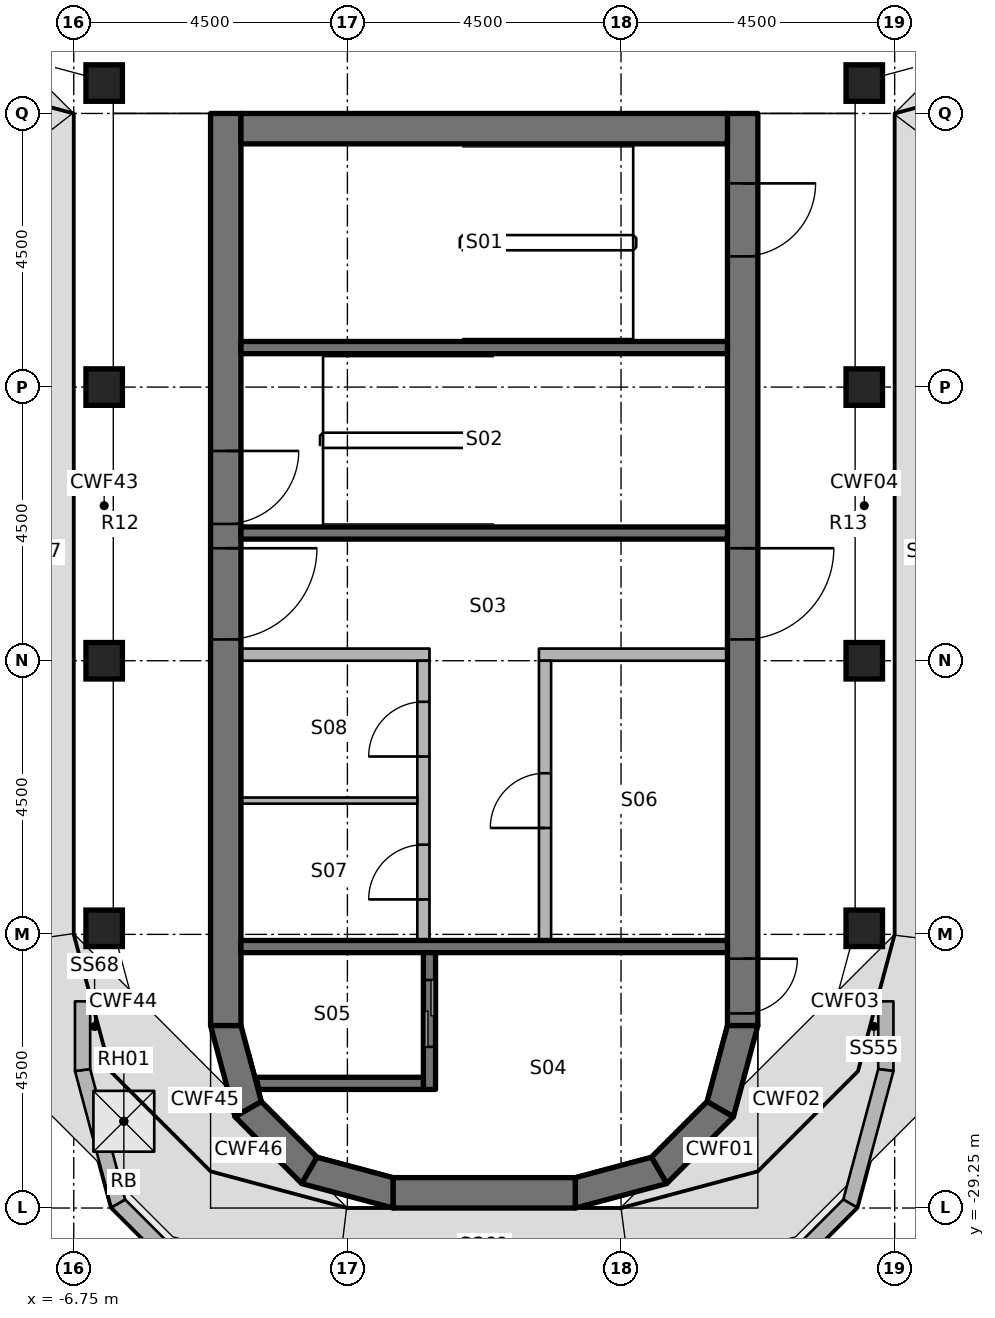
"""IFC4 building model, lengths in metres.
Left out: names, types, materials, properties, quantities, classifications, styles, units other than length and angle.
Written with IfcOpenShell. Run it as: python <this file> out.ifc"""

import sys

from ifc_helpers import new_model, si_unit, direction, frame, frame_2d, origin, origin_2d, place, context, subcontext, project, spatial, polyline, rectangle, outline, extrude, element, fill, save


model = new_model("IFC4")
c1 = context("Model", 3, precision=1e-05, world=origin(), true_north=direction((0.0, 1.0)))
c2 = subcontext(c1, "Body", "Model", "MODEL_VIEW")
j1 = project(units=[si_unit("LENGTHUNIT", "METRE"), si_unit("PLANEANGLEUNIT", "RADIAN")], contexts=[c1])
p1 = place(None, origin())
s1 = spatial("IfcSite", under=j1, at=p1, CompositionType="ELEMENT")
p2 = place(p1, origin())
s2 = spatial("IfcBuilding", under=s1, at=p2, CompositionType="ELEMENT")
p3 = place(p2, frame((0.0, 0.0, 291.6)))
s3 = spatial("IfcBuildingStorey", under=s2, at=p3, CompositionType="ELEMENT", Elevation=291.6)
for number, where, z_axis, x_axis in (
    (1, (-6.25, -24.65, 0.0), (0.0, 0.0, 1.0), (1.0, 0.0, 0.0)),
    (2, (-6.25, -20.25, 0.0), (0.0, 0.0, 1.0), (1.0, 0.0, 0.0)),
    (3, (-6.25, -15.75, 0.0), (0.0, 0.0, 1.0), (1.0, 0.0, 0.0)),
    (4, (-6.25, -10.75, 0.0), (0.0, 0.0, 1.0), (1.0, 0.0, 0.0)),
    (5, (6.25, -24.65, 0.0), (0.0, 0.0, 1.0), (1.0, 0.0, 0.0)),
    (6, (6.25, -20.25, 0.0), (0.0, 0.0, 1.0), (1.0, 0.0, 0.0)),
    (7, (6.25, -15.75, 0.0), (0.0, 0.0, 1.0), (1.0, 0.0, 0.0)),
    (8, (6.25, -10.75, 0.0), (0.0, 0.0, 1.0), (1.0, 0.0, 0.0)),
):
    element("IfcColumn", number, at=place(p3, frame(where, z_axis=z_axis, x_axis=x_axis)), inside=s3, PredefinedType="COLUMN", context=c2, shape_type="SweptSolid", body=[
        extrude(rectangle(XDim=0.6, YDim=0.6, at=origin_2d()), origin(), (0.0, 0.0, 1.0), 3.45),
    ])
p4 = place(p3, frame((-4.25, -11.25, 0.0), z_axis=(0.0, 0.0, 1.0), x_axis=(0.0, -1.0, 0.0)))
e9 = element("IfcWall", 9, at=p4, inside=s3, PredefinedType="SHEAR", context=c2, shape_type="SweptSolid", body=[
    extrude(rectangle(XDim=15.0, YDim=0.5, at=frame_2d((7.5, 0.0))), origin(), (0.0, 0.0, 1.0), 3.6),
])
p5 = place(p4, frame((7.15, 0.0, 0.0)))
e10 = element("IfcOpeningElement", 10, at=p5, cuts=e9, PredefinedType="OPENING", context=c2, shape_type="SweptSolid", body=[
    extrude(rectangle(XDim=1.5, YDim=2.3, at=frame_2d((0.75, 1.15))), frame((0.0, 0.26, 0.0), z_axis=(0.0, -1.0, 0.0), x_axis=(1.0, 0.0, 0.0)), (0.0, 0.0, 1.0), 0.52),
])
p6 = place(p4, frame((5.55, 0.0, 0.0)))
e11 = element("IfcOpeningElement", 11, at=p6, cuts=e9, PredefinedType="OPENING", context=c2, shape_type="SweptSolid", body=[
    extrude(rectangle(XDim=1.2, YDim=2.1, at=frame_2d((0.6, 1.05))), frame((0.0, 0.26, 0.0), z_axis=(0.0, -1.0, 0.0), x_axis=(1.0, 0.0, 0.0)), (0.0, 0.0, 1.0), 0.52),
])
p7 = place(p3, frame((4.25, -11.25, 0.0), z_axis=(0.0, 0.0, 1.0), x_axis=(0.0, -1.0, 0.0)))
e12 = element("IfcWall", 12, at=p7, inside=s3, PredefinedType="SHEAR", context=c2, shape_type="SweptSolid", body=[
    extrude(rectangle(XDim=15.0, YDim=0.5, at=frame_2d((7.5, 0.0))), origin(), (0.0, 0.0, 1.0), 3.6),
])
p8 = place(p7, frame((7.15, 0.0, 0.0)))
e13 = element("IfcOpeningElement", 13, at=p8, cuts=e12, PredefinedType="OPENING", context=c2, shape_type="SweptSolid", body=[
    extrude(rectangle(XDim=1.5, YDim=2.3, at=frame_2d((0.75, 1.15))), frame((0.0, 0.26, 0.0), z_axis=(0.0, -1.0, 0.0), x_axis=(1.0, 0.0, 0.0)), (0.0, 0.0, 1.0), 0.52),
])
p9 = place(p7, frame((13.9, 0.0, 0.0)))
e14 = element("IfcOpeningElement", 14, at=p9, cuts=e12, PredefinedType="OPENING", context=c2, shape_type="SweptSolid", body=[
    extrude(rectangle(XDim=0.9, YDim=2.1, at=frame_2d((0.45, 1.05))), frame((0.0, 0.26, 0.0), z_axis=(0.0, -1.0, 0.0), x_axis=(1.0, 0.0, 0.0)), (0.0, 0.0, 1.0), 0.52),
])
p10 = place(p7, frame((1.15, 0.0, 0.0)))
e15 = element("IfcOpeningElement", 15, at=p10, cuts=e12, PredefinedType="OPENING", context=c2, shape_type="SweptSolid", body=[
    extrude(rectangle(XDim=1.2, YDim=2.1, at=frame_2d((0.6, 1.05))), frame((0.0, 0.26, 0.0), z_axis=(0.0, -1.0, 0.0), x_axis=(1.0, 0.0, 0.0)), (0.0, 0.0, 1.0), 0.52),
])
p11 = place(p3, frame((-4.0, -11.5, 0.0), z_axis=(0.0, 0.0, 1.0), x_axis=(1.0, 0.0, 0.0)))
e16 = element("IfcWall", 16, at=p11, inside=s3, PredefinedType="SHEAR", context=c2, shape_type="SweptSolid", body=[
    extrude(rectangle(XDim=8.0, YDim=0.5, at=frame_2d((4.0, 0.0))), origin(), (0.0, 0.0, 1.0), 3.6),
])
p12 = place(p3, frame((-1.5, -29.0, 0.0), z_axis=(0.0, 0.0, 1.0), x_axis=(1.0, 0.0, 0.0)))
e17 = element("IfcWall", 17, at=p12, inside=s3, PredefinedType="SHEAR", context=c2, shape_type="SweptSolid", body=[
    extrude(rectangle(XDim=3.0, YDim=0.5, at=frame_2d((1.5, 0.0))), origin(), (0.0, 0.0, 1.0), 3.6),
])
p13 = place(p3, origin())
e18 = element("IfcWall", 18, at=p13, inside=s3, PredefinedType="SHEAR", context=c2, shape_type="SweptSolid", body=[
    extrude(outline(polyline([(-4.5, -26.25), (-4.098, -27.75), (-3.665, -27.5), (-4.0, -26.25), (-4.5, -26.25)])), origin(), (0.0, 0.0, 1.0), 3.6),
])
p14 = place(p3, origin())
e19 = element("IfcWall", 19, at=p14, inside=s3, PredefinedType="SHEAR", context=c2, shape_type="SweptSolid", body=[
    extrude(outline(polyline([(-4.098, -27.75), (-3.0, -28.848), (-2.75, -28.415), (-3.665, -27.5), (-4.098, -27.75)])), origin(), (0.0, 0.0, 1.0), 3.6),
])
p15 = place(p3, origin())
e20 = element("IfcWall", 20, at=p15, inside=s3, PredefinedType="SHEAR", context=c2, shape_type="SweptSolid", body=[
    extrude(outline(polyline([(-3.0, -28.848), (-1.5, -29.25), (-1.5, -28.75), (-2.75, -28.415), (-3.0, -28.848)])), origin(), (0.0, 0.0, 1.0), 3.6),
])
p16 = place(p3, origin())
e21 = element("IfcWall", 21, at=p16, inside=s3, PredefinedType="SHEAR", context=c2, shape_type="SweptSolid", body=[
    extrude(outline(polyline([(4.5, -26.25), (4.098, -27.75), (3.665, -27.5), (4.0, -26.25), (4.5, -26.25)])), origin(), (0.0, 0.0, 1.0), 3.6),
])
p17 = place(p3, origin())
e22 = element("IfcWall", 22, at=p17, inside=s3, PredefinedType="SHEAR", context=c2, shape_type="SweptSolid", body=[
    extrude(outline(polyline([(4.098, -27.75), (3.0, -28.848), (2.75, -28.415), (3.665, -27.5), (4.098, -27.75)])), origin(), (0.0, 0.0, 1.0), 3.6),
])
p18 = place(p3, origin())
e23 = element("IfcWall", 23, at=p18, inside=s3, PredefinedType="SHEAR", context=c2, shape_type="SweptSolid", body=[
    extrude(outline(polyline([(3.0, -28.848), (1.5, -29.25), (1.5, -28.75), (2.75, -28.415), (3.0, -28.848)])), origin(), (0.0, 0.0, 1.0), 3.6),
])
p19 = place(p3, origin())
e24 = element("IfcWall", 24, at=p19, inside=s3, PredefinedType="PARAPET", context=c2, shape_type="SweptSolid", body=[
    extrude(outline(polyline([(6.73, -25.851), (6.73, -26.997), (6.48, -26.965), (6.48, -25.851), (6.73, -25.851)])), origin(), (0.0, 0.0, 1.0), 1.22),
])
p20 = place(p3, origin())
e25 = element("IfcWall", 25, at=p20, inside=s3, PredefinedType="PARAPET", context=c2, shape_type="SweptSolid", body=[
    extrude(outline(polyline([(6.73, -26.997), (6.129, -29.24), (5.905, -29.11), (6.48, -26.965), (6.73, -26.997)])), origin(), (0.0, 0.0, 1.0), 1.22),
])
p21 = place(p3, origin())
e26 = element("IfcWall", 26, at=p21, inside=s3, PredefinedType="PARAPET", context=c2, shape_type="SweptSolid", body=[
    extrude(outline(polyline([(6.129, -29.24), (4.49, -30.879), (4.36, -30.655), (5.905, -29.11), (6.129, -29.24)])), origin(), (0.0, 0.0, 1.0), 1.22),
])
p22 = place(p3, origin())
e27 = element("IfcWall", 27, at=p22, inside=s3, PredefinedType="PARAPET", context=c2, shape_type="SweptSolid", body=[
    extrude(outline(polyline([(-4.49, -30.879), (-6.129, -29.24), (-5.905, -29.11), (-4.36, -30.655), (-4.49, -30.879)])), origin(), (0.0, 0.0, 1.0), 1.22),
])
p23 = place(p3, origin())
e28 = element("IfcWall", 28, at=p23, inside=s3, PredefinedType="PARAPET", context=c2, shape_type="SweptSolid", body=[
    extrude(outline(polyline([(-6.129, -29.24), (-6.73, -26.997), (-6.48, -26.965), (-5.905, -29.11), (-6.129, -29.24)])), origin(), (0.0, 0.0, 1.0), 1.22),
])
p24 = place(p3, origin())
e29 = element("IfcWall", 29, at=p24, inside=s3, PredefinedType="PARAPET", context=c2, shape_type="SweptSolid", body=[
    extrude(outline(polyline([(-6.73, -26.997), (-6.73, -25.851), (-6.48, -25.851), (-6.48, -26.965), (-6.73, -26.997)])), origin(), (0.0, 0.0, 1.0), 1.22),
])
p25 = place(p3, frame((4.0, -24.95, 0.0), z_axis=(0.0, 0.0, 1.0), x_axis=(-1.0, 0.0, 0.0)))
e30 = element("IfcWall", 30, at=p25, inside=s3, PredefinedType="SHEAR", context=c2, shape_type="SweptSolid", body=[
    extrude(rectangle(XDim=8.0, YDim=0.2, at=frame_2d((4.0, 0.0))), origin(), (0.0, 0.0, 1.0), 3.45),
])
p26 = place(p3, frame((-0.9, -27.3, 0.0), z_axis=(0.0, 0.0, 1.0), x_axis=(0.0, 1.0, 0.0)))
e31 = element("IfcWall", 31, at=p26, inside=s3, PredefinedType="SHEAR", context=c2, shape_type="SweptSolid", body=[
    extrude(rectangle(XDim=2.25, YDim=0.2, at=frame_2d((1.125, 0.0))), origin(), (0.0, 0.0, 1.0), 3.45),
])
p27 = place(p26, frame((0.7, 0.0, 0.0)))
e32 = element("IfcOpeningElement", 32, at=p27, cuts=e31, PredefinedType="OPENING", context=c2, shape_type="SweptSolid", body=[
    extrude(rectangle(XDim=1.1, YDim=2.3, at=frame_2d((0.55, 1.15))), frame((0.0, 0.11, 0.0), z_axis=(0.0, -1.0, 0.0), x_axis=(1.0, 0.0, 0.0)), (0.0, 0.0, 1.0), 0.22),
])
p28 = place(p3, origin())
e33 = element("IfcWall", 33, at=p28, inside=s3, PredefinedType="SHEAR", context=c2, shape_type="SweptSolid", body=[
    extrude(outline(polyline([(-1.0, -27.1), (-3.755, -27.1), (-3.701, -27.3), (-1.0, -27.3), (-1.0, -27.1)])), origin(), (0.0, 0.0, 1.0), 3.45),
])
for number, where, z_axis, x_axis in (
    (34, (4.0, -18.15, 0.0), (0.0, 0.0, 1.0), (-1.0, 0.0, 0.0)),
    (35, (4.0, -15.1, 0.0), (0.0, 0.0, 1.0), (-1.0, 0.0, 0.0)),
):
    element("IfcWall", number, at=place(p3, frame(where, z_axis=z_axis, x_axis=x_axis)), inside=s3, PredefinedType="SHEAR", context=c2, shape_type="SweptSolid", body=[
        extrude(rectangle(XDim=8.0, YDim=0.2, at=frame_2d((4.0, 0.0))), origin(), (0.0, 0.0, 1.0), 3.45),
    ])
p29 = place(p3, frame((4.0, -20.15, 0.0), z_axis=(0.0, 0.0, 1.0), x_axis=(-1.0, 0.0, 0.0)))
e36 = element("IfcWall", 36, at=p29, inside=s3, PredefinedType="PARTITIONING", context=c2, shape_type="SweptSolid", body=[
    extrude(rectangle(XDim=3.1, YDim=0.2, at=frame_2d((1.55, 0.0))), origin(), (0.0, 0.0, 1.0), 3.45),
])
p30 = place(p3, frame((1.0, -24.85, 0.0), z_axis=(0.0, 0.0, 1.0), x_axis=(0.0, 1.0, 0.0)))
e37 = element("IfcWall", 37, at=p30, inside=s3, PredefinedType="PARTITIONING", context=c2, shape_type="SweptSolid", body=[
    extrude(rectangle(XDim=4.6, YDim=0.2, at=frame_2d((2.3, 0.0))), origin(), (0.0, 0.0, 1.0), 3.45),
])
p31 = place(p30, frame((1.85, 0.0, 0.0)))
e38 = element("IfcOpeningElement", 38, at=p31, cuts=e37, PredefinedType="OPENING", context=c2, shape_type="SweptSolid", body=[
    extrude(rectangle(XDim=0.9, YDim=2.1, at=frame_2d((0.45, 1.05))), frame((0.0, 0.11, 0.0), z_axis=(0.0, -1.0, 0.0), x_axis=(1.0, 0.0, 0.0)), (0.0, 0.0, 1.0), 0.22),
])
p32 = place(p3, frame((-0.9, -20.15, 0.0), z_axis=(0.0, 0.0, 1.0), x_axis=(-1.0, 0.0, 0.0)))
e39 = element("IfcWall", 39, at=p32, inside=s3, PredefinedType="PARTITIONING", context=c2, shape_type="SweptSolid", body=[
    extrude(rectangle(XDim=3.1, YDim=0.2, at=frame_2d((1.55, 0.0))), origin(), (0.0, 0.0, 1.0), 3.45),
])
p33 = place(p3, frame((-1.0, -24.85, 0.0), z_axis=(0.0, 0.0, 1.0), x_axis=(0.0, 1.0, 0.0)))
e40 = element("IfcWall", 40, at=p33, inside=s3, PredefinedType="PARTITIONING", context=c2, shape_type="SweptSolid", body=[
    extrude(rectangle(XDim=4.6, YDim=0.2, at=frame_2d((2.3, 0.0))), origin(), (0.0, 0.0, 1.0), 3.45),
])
p34 = place(p33, frame((0.675, 0.0, 0.0)))
e41 = element("IfcOpeningElement", 41, at=p34, cuts=e40, PredefinedType="OPENING", context=c2, shape_type="SweptSolid", body=[
    extrude(rectangle(XDim=0.9, YDim=2.1, at=frame_2d((0.45, 1.05))), frame((0.0, 0.11, 0.0), z_axis=(0.0, -1.0, 0.0), x_axis=(1.0, 0.0, 0.0)), (0.0, 0.0, 1.0), 0.22),
])
p35 = place(p33, frame((3.025, 0.0, 0.0)))
e42 = element("IfcOpeningElement", 42, at=p35, cuts=e40, PredefinedType="OPENING", context=c2, shape_type="SweptSolid", body=[
    extrude(rectangle(XDim=0.9, YDim=2.1, at=frame_2d((0.45, 1.05))), frame((0.0, 0.11, 0.0), z_axis=(0.0, -1.0, 0.0), x_axis=(1.0, 0.0, 0.0)), (0.0, 0.0, 1.0), 0.22),
])
p36 = place(p3, frame((-1.1, -22.55, 0.0), z_axis=(0.0, 0.0, 1.0), x_axis=(-1.0, 0.0, 0.0)))
e43 = element("IfcWall", 43, at=p36, inside=s3, PredefinedType="PARTITIONING", context=c2, shape_type="SweptSolid", body=[
    extrude(rectangle(XDim=2.9, YDim=0.1, at=frame_2d((1.45, 0.0))), origin(), (0.0, 0.0, 1.0), 3.45),
])
p37 = place(p3, frame((0.0, 0.0, -0.15)))
p38 = place(p37, frame((-5.927, -27.823, 0.0)))
p39 = place(p38, frame((0.0, 0.0, 0.1)))
e44 = element("IfcWindow", 44, at=p39, inside=s3, PartitioningType="SINGLE_PANEL", PredefinedType="SKYLIGHT", context=c2, shape_type="SweptSolid", body=[
    extrude(rectangle(XDim=1.0, YDim=1.0, at=origin_2d()), origin(), (0.0, 0.0, 1.0), 0.05),
])
p40 = place(p8, origin())
e45 = element("IfcDoor", 45, at=p40, inside=s3, OperationType="DOUBLE_DOOR_SINGLE_SWING", PredefinedType="DOOR", context=c2, shape_type="SweptSolid", body=[
    extrude(rectangle(XDim=1.5, YDim=2.3, at=frame_2d((0.75, 1.15))), frame((0.0, 0.025, 0.0), z_axis=(0.0, -1.0, 0.0), x_axis=(1.0, 0.0, 0.0)), (0.0, 0.0, 1.0), 0.05),
])
fill(e13, e45)
p41 = place(p5, origin())
e46 = element("IfcDoor", 46, at=p41, inside=s3, OperationType="DOUBLE_DOOR_SINGLE_SWING", PredefinedType="DOOR", context=c2, shape_type="SweptSolid", body=[
    extrude(rectangle(XDim=1.5, YDim=2.3, at=frame_2d((0.75, 1.15))), frame((0.0, 0.025, 0.0), z_axis=(0.0, -1.0, 0.0), x_axis=(1.0, 0.0, 0.0)), (0.0, 0.0, 1.0), 0.05),
])
fill(e10, e46)
p42 = place(p9, origin())
e47 = element("IfcDoor", 47, at=p42, inside=s3, OperationType="SINGLE_SWING_RIGHT", PredefinedType="DOOR", context=c2, shape_type="SweptSolid", body=[
    extrude(rectangle(XDim=0.9, YDim=2.1, at=frame_2d((0.45, 1.05))), frame((0.0, 0.025, 0.0), z_axis=(0.0, -1.0, 0.0), x_axis=(1.0, 0.0, 0.0)), (0.0, 0.0, 1.0), 0.05),
])
fill(e14, e47)
p43 = place(p6, origin())
e48 = element("IfcDoor", 48, at=p43, inside=s3, OperationType="SINGLE_SWING_LEFT", PredefinedType="DOOR", context=c2, shape_type="SweptSolid", body=[
    extrude(rectangle(XDim=1.2, YDim=2.1, at=frame_2d((0.6, 1.05))), frame((0.0, 0.025, 0.0), z_axis=(0.0, -1.0, 0.0), x_axis=(1.0, 0.0, 0.0)), (0.0, 0.0, 1.0), 0.05),
])
fill(e11, e48)
p44 = place(p10, origin())
e49 = element("IfcDoor", 49, at=p44, inside=s3, OperationType="SINGLE_SWING_LEFT", PredefinedType="DOOR", context=c2, shape_type="SweptSolid", body=[
    extrude(rectangle(XDim=1.2, YDim=2.1, at=frame_2d((0.6, 1.05))), frame((0.0, 0.025, 0.0), z_axis=(0.0, -1.0, 0.0), x_axis=(1.0, 0.0, 0.0)), (0.0, 0.0, 1.0), 0.05),
])
fill(e15, e49)
p45 = place(p27, origin())
e50 = element("IfcDoor", 50, at=p45, inside=s3, OperationType="DOUBLE_DOOR_SLIDING", PredefinedType="DOOR", context=c2, shape_type="SweptSolid", body=[
    extrude(rectangle(XDim=1.1, YDim=2.3, at=frame_2d((0.55, 1.15))), frame((0.0, 0.025, 0.0), z_axis=(0.0, -1.0, 0.0), x_axis=(1.0, 0.0, 0.0)), (0.0, 0.0, 1.0), 0.05),
])
fill(e32, e50)
p46 = place(p31, origin())
e51 = element("IfcDoor", 51, at=p46, inside=s3, OperationType="SINGLE_SWING_RIGHT", PredefinedType="DOOR", context=c2, shape_type="SweptSolid", body=[
    extrude(rectangle(XDim=0.9, YDim=2.1, at=frame_2d((0.45, 1.05))), frame((0.0, 0.025, 0.0), z_axis=(0.0, -1.0, 0.0), x_axis=(1.0, 0.0, 0.0)), (0.0, 0.0, 1.0), 0.05),
])
fill(e38, e51)
p47 = place(p34, origin())
e52 = element("IfcDoor", 52, at=p47, inside=s3, OperationType="SINGLE_SWING_LEFT", PredefinedType="DOOR", context=c2, shape_type="SweptSolid", body=[
    extrude(rectangle(XDim=0.9, YDim=2.1, at=frame_2d((0.45, 1.05))), frame((0.0, 0.025, 0.0), z_axis=(0.0, -1.0, 0.0), x_axis=(1.0, 0.0, 0.0)), (0.0, 0.0, 1.0), 0.05),
])
fill(e41, e52)
p48 = place(p35, origin())
e53 = element("IfcDoor", 53, at=p48, inside=s3, OperationType="SINGLE_SWING_RIGHT", PredefinedType="DOOR", context=c2, shape_type="SweptSolid", body=[
    extrude(rectangle(XDim=0.9, YDim=2.1, at=frame_2d((0.45, 1.05))), frame((0.0, 0.025, 0.0), z_axis=(0.0, -1.0, 0.0), x_axis=(1.0, 0.0, 0.0)), (0.0, 0.0, 1.0), 0.05),
])
fill(e42, e53)
save(model, sys.argv[1])
